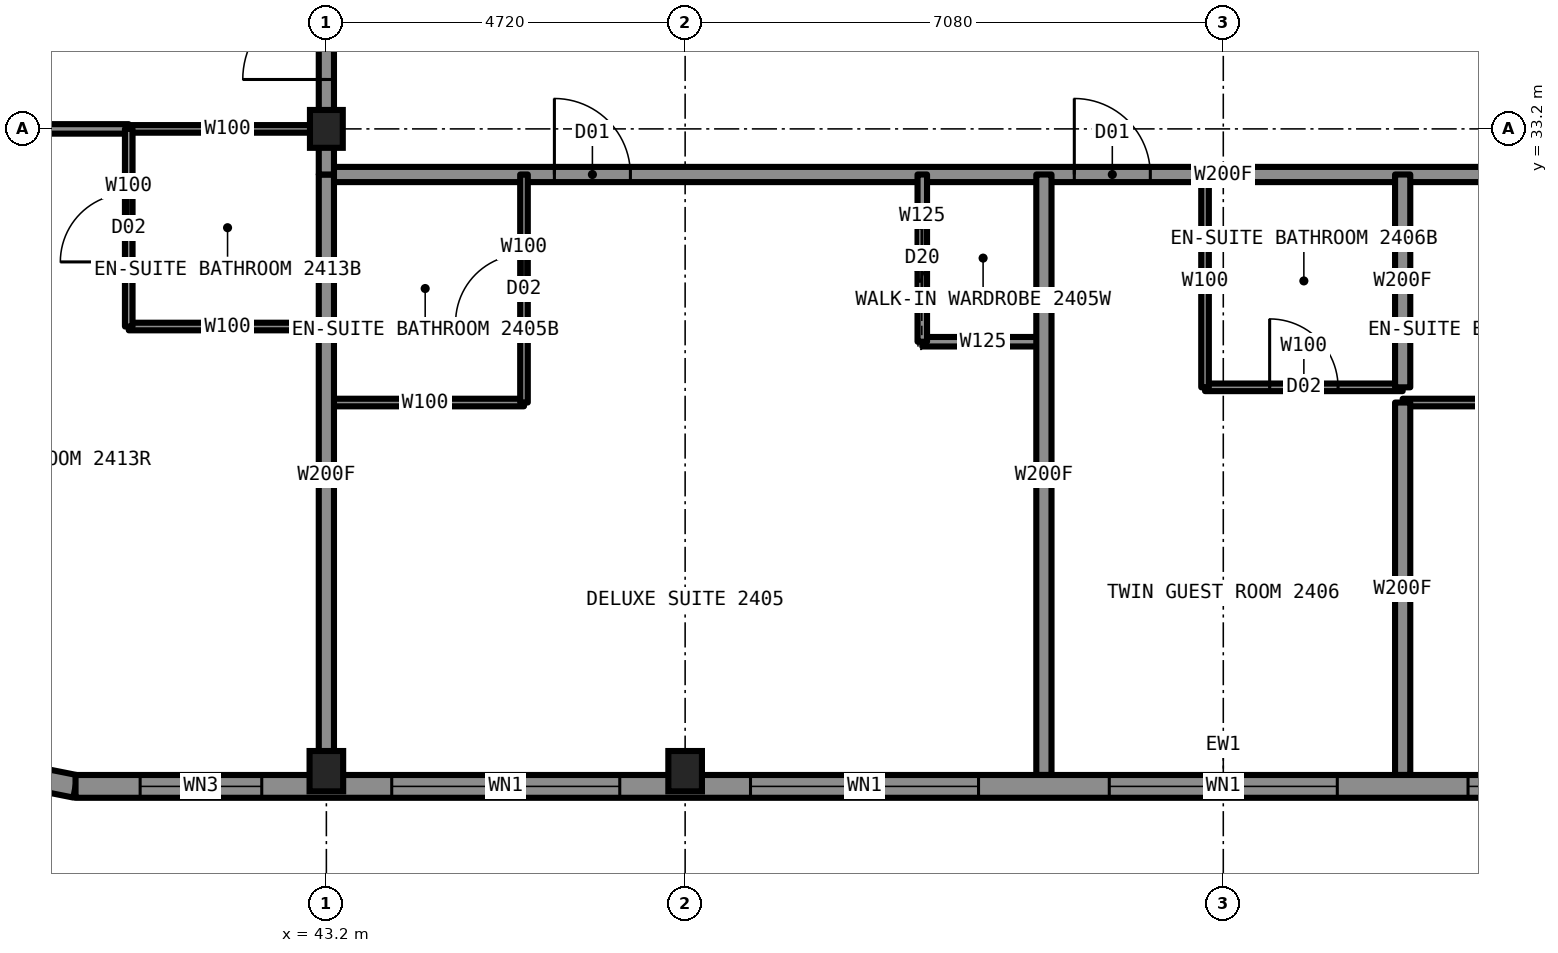
"""IFC4 building model, lengths in metres.
Left out: names, types, materials, properties, quantities, classifications, styles, units other than length and angle.
Written with IfcOpenShell. Run it as: python <this file> out.ifc"""

import sys

from ifc_helpers import new_model, si_unit, direction, frame, frame_2d, origin, origin_2d, place, context, subcontext, project, spatial, rectangle, i_section, extrude, element, fill, save


model = new_model("IFC4")
c1 = context("Model", 3, precision=1e-05, world=origin(), true_north=direction((0.0, 1.0)))
c2 = subcontext(c1, "Body", "Model", "MODEL_VIEW")
j1 = project(units=[si_unit("LENGTHUNIT", "METRE"), si_unit("PLANEANGLEUNIT", "RADIAN")], contexts=[c1])
p1 = place(None, origin())
s1 = spatial("IfcSite", under=j1, at=p1, CompositionType="ELEMENT")
p2 = place(p1, origin())
s2 = spatial("IfcBuilding", under=s1, at=p2, CompositionType="ELEMENT")
p3 = place(p2, frame((0.0, 0.0, 93.4)))
s3 = spatial("IfcBuildingStorey", under=s2, at=p3, CompositionType="ELEMENT", Elevation=93.4)
for number, where, z_axis, x_axis in (
    (1, (43.2, 24.75, 0.0), (0.0, 0.0, 1.0), (1.0, 0.0, 0.0)),
    (2, (47.92, 24.75, 0.0), (0.0, 0.0, 1.0), (1.0, 0.0, 0.0)),
):
    element("IfcColumn", number, at=place(p3, frame(where, z_axis=z_axis, x_axis=x_axis)), inside=s3, PredefinedType="COLUMN", context=c2, shape_type="SweptSolid", body=[
        extrude(i_section(OverallWidth=0.442, OverallDepth=0.531, WebThickness=0.066, FlangeThickness=0.106, at=origin_2d()), origin(), (0.0, 0.0, 1.0), 3.5),
    ])
p4 = place(p3, frame((43.2, 33.2, 0.0), z_axis=(0.0, 0.0, 1.0), x_axis=(1.0, 0.0, 0.0)))
e3 = element("IfcColumn", 3, at=p4, inside=s3, PredefinedType="COLUMN", context=c2, shape_type="SweptSolid", body=[
    extrude(i_section(OverallWidth=0.432, OverallDepth=0.498, WebThickness=0.056, FlangeThickness=0.089, at=origin_2d()), origin(), (0.0, 0.0, 1.0), 3.5),
])
p5 = place(p3, frame((40.6, 33.2, 0.0), z_axis=(0.0, 0.0, 1.0), x_axis=(1.0, 0.0, 0.0)))
e4 = element("IfcWall", 4, at=p5, inside=s3, PredefinedType="PARTITIONING", context=c2, shape_type="SweptSolid", body=[
    extrude(rectangle(XDim=2.6, YDim=0.1, at=frame_2d((1.3, 0.0))), origin(), (0.0, 0.0, 1.0), 2.573),
])
p6 = place(p3, frame((34.7, 33.2, 0.0), z_axis=(0.0, 0.0, 1.0), x_axis=(1.0, 0.0, 0.0)))
e5 = element("IfcWall", 5, at=p6, inside=s3, PredefinedType="PARTITIONING", context=c2, shape_type="SweptSolid", body=[
    extrude(rectangle(XDim=5.9, YDim=0.125, at=frame_2d((2.95, 0.0))), origin(), (0.0, 0.0, 1.0), 2.573),
])
p7 = place(p6, frame((3.85, 0.0, 0.0)))
e6 = element("IfcOpeningElement", 6, at=p7, cuts=e5, PredefinedType="OPENING", context=c2, shape_type="SweptSolid", body=[
    extrude(rectangle(XDim=0.9, YDim=2.2, at=frame_2d((0.45, 1.1))), frame((0.0, 0.073, 0.0), z_axis=(0.0, -1.0, 0.0), x_axis=(1.0, 0.0, 0.0)), (0.0, 0.0, 1.0), 0.145),
])
p8 = place(p3, frame((43.2, 32.6, 0.0), z_axis=(0.0, 0.0, 1.0), x_axis=(1.0, 0.0, 0.0)))
e7 = element("IfcWall", 7, at=p8, inside=s3, PredefinedType="PARTITIONING", context=c2, shape_type="SweptSolid", body=[
    extrude(rectangle(XDim=23.6, YDim=0.2, at=frame_2d((11.8, 0.0))), origin(), (0.0, 0.0, 1.0), 3.33),
])
p9 = place(p8, frame((3.0, 0.0, 0.0)))
e8 = element("IfcOpeningElement", 8, at=p9, cuts=e7, PredefinedType="OPENING", context=c2, shape_type="SweptSolid", body=[
    extrude(rectangle(XDim=1.0, YDim=2.2, at=frame_2d((0.5, 1.1))), frame((0.0, 0.11, 0.0), z_axis=(0.0, -1.0, 0.0), x_axis=(1.0, 0.0, 0.0)), (0.0, 0.0, 1.0), 0.22),
])
p10 = place(p8, frame((9.84, 0.0, 0.0)))
e9 = element("IfcOpeningElement", 9, at=p10, cuts=e7, PredefinedType="OPENING", context=c2, shape_type="SweptSolid", body=[
    extrude(rectangle(XDim=1.0, YDim=2.2, at=frame_2d((0.5, 1.1))), frame((0.0, 0.11, 0.0), z_axis=(0.0, -1.0, 0.0), x_axis=(1.0, 0.0, 0.0)), (0.0, 0.0, 1.0), 0.22),
])
p11 = place(p8, frame((17.16, 0.0, 0.0)))
e10 = element("IfcOpeningElement", 10, at=p11, cuts=e7, PredefinedType="OPENING", context=c2, shape_type="SweptSolid", body=[
    extrude(rectangle(XDim=1.0, YDim=2.2, at=frame_2d((0.5, 1.1))), frame((0.0, 0.11, 0.0), z_axis=(0.0, -1.0, 0.0), x_axis=(1.0, 0.0, 0.0)), (0.0, 0.0, 1.0), 0.22),
])
p12 = place(p3, frame((40.6, 30.6, 0.0), z_axis=(0.0, 0.0, 1.0), x_axis=(1.0, 0.0, 0.0)))
e11 = element("IfcWall", 11, at=p12, inside=s3, PredefinedType="PARTITIONING", context=c2, shape_type="SweptSolid", body=[
    extrude(rectangle(XDim=2.6, YDim=0.1, at=frame_2d((1.3, 0.0))), origin(), (0.0, 0.0, 1.0), 3.33),
])
p13 = place(p3, frame((51.04, 30.4, 0.0), z_axis=(0.0, 0.0, 1.0), x_axis=(1.0, 0.0, 0.0)))
e12 = element("IfcWall", 12, at=p13, inside=s3, PredefinedType="PARTITIONING", context=c2, shape_type="SweptSolid", body=[
    extrude(rectangle(XDim=1.6, YDim=0.125, at=frame_2d((0.8, 0.0))), origin(), (0.0, 0.0, 1.0), 3.33),
])
p14 = place(p3, frame((54.76, 29.8, 0.0), z_axis=(0.0, 0.0, 1.0), x_axis=(1.0, 0.0, 0.0)))
e13 = element("IfcWall", 13, at=p14, inside=s3, PredefinedType="PARTITIONING", context=c2, shape_type="SweptSolid", body=[
    extrude(rectangle(XDim=2.6, YDim=0.1, at=frame_2d((1.3, 0.0))), origin(), (0.0, 0.0, 1.0), 2.731),
])
p15 = place(p14, frame((0.85, 0.0, 0.0)))
e14 = element("IfcOpeningElement", 14, at=p15, cuts=e13, PredefinedType="OPENING", context=c2, shape_type="SweptSolid", body=[
    extrude(rectangle(XDim=0.9, YDim=2.1, at=frame_2d((0.45, 1.05))), frame((0.0, 0.06, 0.0), z_axis=(0.0, -1.0, 0.0), x_axis=(1.0, 0.0, 0.0)), (0.0, 0.0, 1.0), 0.12),
])
p16 = place(p3, frame((43.2, 29.6, 0.0), z_axis=(0.0, 0.0, 1.0), x_axis=(1.0, 0.0, 0.0)))
e15 = element("IfcWall", 15, at=p16, inside=s3, PredefinedType="PARTITIONING", context=c2, shape_type="SweptSolid", body=[
    extrude(rectangle(XDim=2.6, YDim=0.1, at=frame_2d((1.3, 0.0))), origin(), (0.0, 0.0, 1.0), 3.33),
])
p17 = place(p3, frame((57.36, 29.6, 0.0), z_axis=(0.0, 0.0, 1.0), x_axis=(1.0, 0.0, 0.0)))
e16 = element("IfcWall", 16, at=p17, inside=s3, PredefinedType="PARTITIONING", context=c2, shape_type="SweptSolid", body=[
    extrude(rectangle(XDim=2.6, YDim=0.1, at=frame_2d((1.3, 0.0))), origin(), (0.0, 0.0, 1.0), 3.33),
])
p18 = place(p3, frame((54.76, 29.8, 0.0), z_axis=(0.0, 0.0, 1.0), x_axis=(0.0, 1.0, 0.0)))
e17 = element("IfcWall", 17, at=p18, inside=s3, PredefinedType="PARTITIONING", context=c2, shape_type="SweptSolid", body=[
    extrude(rectangle(XDim=2.8, YDim=0.1, at=frame_2d((1.4, 0.0))), origin(), (0.0, 0.0, 1.0), 3.33),
])
p19 = place(p3, frame((43.2, 33.22, 0.0), z_axis=(0.0, 0.0, 1.0), x_axis=(0.0, 1.0, 0.0)))
e18 = element("IfcWall", 18, at=p19, inside=s3, PredefinedType="PARTITIONING", context=c2, shape_type="SweptSolid", body=[
    extrude(rectangle(XDim=23.56, YDim=0.2, at=frame_2d((11.78, 0.0))), origin(), (0.0, 0.0, 1.0), 3.33),
])
p20 = place(p19, frame((16.4, 0.0, 0.0)))
e19 = element("IfcOpeningElement", 19, at=p20, cuts=e18, PredefinedType="OPENING", context=c2, shape_type="SweptSolid", body=[
    extrude(rectangle(XDim=1.0, YDim=2.2, at=frame_2d((0.5, 1.1))), frame((0.0, 0.11, 0.0), z_axis=(0.0, -1.0, 0.0), x_axis=(1.0, 0.0, 0.0)), (0.0, 0.0, 1.0), 0.22),
])
p21 = place(p19, frame((21.83, 0.0, 0.0)))
e20 = element("IfcOpeningElement", 20, at=p21, cuts=e18, PredefinedType="OPENING", context=c2, shape_type="SweptSolid", body=[
    extrude(rectangle(XDim=1.1, YDim=2.2, at=frame_2d((0.55, 1.1))), frame((0.0, 0.11, 0.0), z_axis=(0.0, -1.0, 0.0), x_axis=(1.0, 0.0, 0.0)), (0.0, 0.0, 1.0), 0.22),
])
p22 = place(p19, frame((0.63, 0.0, 0.0)))
e21 = element("IfcOpeningElement", 21, at=p22, cuts=e18, PredefinedType="OPENING", context=c2, shape_type="SweptSolid", body=[
    extrude(rectangle(XDim=1.1, YDim=2.2, at=frame_2d((0.55, 1.1))), frame((0.0, 0.11, 0.0), z_axis=(0.0, -1.0, 0.0), x_axis=(1.0, 0.0, 0.0)), (0.0, 0.0, 1.0), 0.22),
])
p23 = place(p19, frame((7.45, 0.0, 0.0)))
e22 = element("IfcOpeningElement", 22, at=p23, cuts=e18, PredefinedType="OPENING", context=c2, shape_type="SweptSolid", body=[
    extrude(rectangle(XDim=2.0, YDim=2.4, at=frame_2d((1.0, 1.2))), frame((0.0, 0.11, 0.0), z_axis=(0.0, -1.0, 0.0), x_axis=(1.0, 0.0, 0.0)), (0.0, 0.0, 1.0), 0.22),
])
p24 = place(p19, frame((5.4, 0.0, 0.0)))
e23 = element("IfcOpeningElement", 23, at=p24, cuts=e18, PredefinedType="OPENING", context=c2, shape_type="SweptSolid", body=[
    extrude(rectangle(XDim=1.0, YDim=2.1, at=frame_2d((0.5, 1.05))), frame((0.0, 0.11, 0.0), z_axis=(0.0, -1.0, 0.0), x_axis=(1.0, 0.0, 0.0)), (0.0, 0.0, 1.0), 0.22),
])
p25 = place(p3, frame((43.2, 24.7, 0.0), z_axis=(0.0, 0.0, 1.0), x_axis=(0.0, 1.0, 0.0)))
e24 = element("IfcWall", 24, at=p25, inside=s3, PredefinedType="PARTITIONING", context=c2, shape_type="SweptSolid", body=[
    extrude(rectangle(XDim=7.9, YDim=0.2, at=frame_2d((3.95, 0.0))), origin(), (0.0, 0.0, 1.0), 2.573),
])
p26 = place(p3, frame((40.6, 30.6, 0.0), z_axis=(0.0, 0.0, 1.0), x_axis=(0.0, 1.0, 0.0)))
e25 = element("IfcWall", 25, at=p26, inside=s3, PredefinedType="PARTITIONING", context=c2, shape_type="SweptSolid", body=[
    extrude(rectangle(XDim=2.6, YDim=0.1, at=frame_2d((1.3, 0.0))), origin(), (0.0, 0.0, 1.0), 3.33),
])
p27 = place(p26, frame((0.85, 0.0, 0.0)))
e26 = element("IfcOpeningElement", 26, at=p27, cuts=e25, PredefinedType="OPENING", context=c2, shape_type="SweptSolid", body=[
    extrude(rectangle(XDim=0.9, YDim=2.1, at=frame_2d((0.45, 1.05))), frame((0.0, 0.06, 0.0), z_axis=(0.0, -1.0, 0.0), x_axis=(1.0, 0.0, 0.0)), (0.0, 0.0, 1.0), 0.12),
])
p28 = place(p3, frame((52.64, 24.7, 0.0), z_axis=(0.0, 0.0, 1.0), x_axis=(0.0, 1.0, 0.0)))
e27 = element("IfcWall", 27, at=p28, inside=s3, PredefinedType="PARTITIONING", context=c2, shape_type="SweptSolid", body=[
    extrude(rectangle(XDim=7.9, YDim=0.2, at=frame_2d((3.95, 0.0))), origin(), (0.0, 0.0, 1.0), 3.33),
])
p29 = place(p3, frame((51.04, 30.4, 0.0), z_axis=(0.0, 0.0, 1.0), x_axis=(0.0, 1.0, 0.0)))
e28 = element("IfcWall", 28, at=p29, inside=s3, PredefinedType="PARTITIONING", context=c2, shape_type="SweptSolid", body=[
    extrude(rectangle(XDim=2.2, YDim=0.125, at=frame_2d((1.1, 0.0))), origin(), (0.0, 0.0, 1.0), 3.33),
])
p30 = place(p29, frame((0.7, 0.0, 0.0)))
e29 = element("IfcOpeningElement", 29, at=p30, cuts=e28, PredefinedType="OPENING", context=c2, shape_type="SweptSolid", body=[
    extrude(rectangle(XDim=0.8, YDim=2.1, at=frame_2d((0.4, 1.05))), frame((0.0, 0.073, 0.0), z_axis=(0.0, -1.0, 0.0), x_axis=(1.0, 0.0, 0.0)), (0.0, 0.0, 1.0), 0.145),
])
p31 = place(p3, frame((45.8, 29.6, 0.0), z_axis=(0.0, 0.0, 1.0), x_axis=(0.0, 1.0, 0.0)))
e30 = element("IfcWall", 30, at=p31, inside=s3, PredefinedType="PARTITIONING", context=c2, shape_type="SweptSolid", body=[
    extrude(rectangle(XDim=3.0, YDim=0.1, at=frame_2d((1.5, 0.0))), origin(), (0.0, 0.0, 1.0), 3.33),
])
p32 = place(p31, frame((1.05, 0.0, 0.0)))
e31 = element("IfcOpeningElement", 31, at=p32, cuts=e30, PredefinedType="OPENING", context=c2, shape_type="SweptSolid", body=[
    extrude(rectangle(XDim=0.9, YDim=2.1, at=frame_2d((0.45, 1.05))), frame((0.0, 0.06, 0.0), z_axis=(0.0, -1.0, 0.0), x_axis=(1.0, 0.0, 0.0)), (0.0, 0.0, 1.0), 0.12),
])
p33 = place(p3, frame((57.36, 24.7, 0.0), z_axis=(0.0, 0.0, 1.0), x_axis=(0.0, 1.0, 0.0)))
e32 = element("IfcWall", 32, at=p33, inside=s3, PredefinedType="PARTITIONING", context=c2, shape_type="SweptSolid", body=[
    extrude(rectangle(XDim=4.9, YDim=0.2, at=frame_2d((2.45, 0.0))), origin(), (0.0, 0.0, 1.0), 3.33),
])
p34 = place(p3, frame((57.36, 29.8, 0.0), z_axis=(0.0, 0.0, 1.0), x_axis=(0.0, 1.0, 0.0)))
e33 = element("IfcWall", 33, at=p34, inside=s3, PredefinedType="PARTITIONING", context=c2, shape_type="SweptSolid", body=[
    extrude(rectangle(XDim=2.8, YDim=0.2, at=frame_2d((1.4, 0.0))), origin(), (0.0, 0.0, 1.0), 3.33),
])
p35 = place(p3, frame((37.853, 24.957, 0.0), z_axis=(0.0, 0.0, 1.0), x_axis=(0.980787050784, -0.195081421501, 0.0)))
e34 = element("IfcWall", 34, at=p35, inside=s3, PredefinedType="SOLIDWALL", context=c2, shape_type="SweptSolid", body=[
    extrude(rectangle(XDim=2.087, YDim=0.3, at=frame_2d((1.044, 0.0))), origin(), (0.0, 0.0, 1.0), 3.33),
])
p36 = place(p35, frame((0.444, 0.0, 0.5)))
e35 = element("IfcOpeningElement", 35, at=p36, cuts=e34, PredefinedType="OPENING", context=c2, shape_type="SweptSolid", body=[
    extrude(rectangle(XDim=1.2, YDim=2.0, at=frame_2d((0.6, 1.0))), frame((0.0, 0.16, 0.0), z_axis=(0.0, -1.0, 0.0), x_axis=(1.0, 0.0, 0.0)), (0.0, 0.0, 1.0), 0.32),
])
p37 = place(p3, frame((39.9, 24.55, 0.0), z_axis=(0.0, 0.0, 1.0), x_axis=(1.0, 0.0, 0.0)))
e36 = element("IfcWall", 36, at=p37, inside=s3, PredefinedType="SOLIDWALL", context=c2, shape_type="SweptSolid", body=[
    extrude(rectangle(XDim=30.2, YDim=0.3, at=frame_2d((15.1, 0.0))), origin(), (0.0, 0.0, 1.0), 2.83),
])
p38 = place(p37, frame((0.85, 0.0, 0.5)))
e37 = element("IfcOpeningElement", 37, at=p38, cuts=e36, PredefinedType="OPENING", context=c2, shape_type="SweptSolid", body=[
    extrude(rectangle(XDim=1.6, YDim=2.0, at=frame_2d((0.8, 1.0))), frame((0.0, 0.16, 0.0), z_axis=(0.0, -1.0, 0.0), x_axis=(1.0, 0.0, 0.0)), (0.0, 0.0, 1.0), 0.32),
])
p39 = place(p37, frame((4.16, 0.0, 0.5)))
e38 = element("IfcOpeningElement", 38, at=p39, cuts=e36, PredefinedType="OPENING", context=c2, shape_type="SweptSolid", body=[
    extrude(rectangle(XDim=3.0, YDim=2.0, at=frame_2d((1.5, 1.0))), frame((0.0, 0.16, 0.0), z_axis=(0.0, -1.0, 0.0), x_axis=(1.0, 0.0, 0.0)), (0.0, 0.0, 1.0), 0.32),
])
p40 = place(p37, frame((8.88, 0.0, 0.5)))
e39 = element("IfcOpeningElement", 39, at=p40, cuts=e36, PredefinedType="OPENING", context=c2, shape_type="SweptSolid", body=[
    extrude(rectangle(XDim=3.0, YDim=2.0, at=frame_2d((1.5, 1.0))), frame((0.0, 0.16, 0.0), z_axis=(0.0, -1.0, 0.0), x_axis=(1.0, 0.0, 0.0)), (0.0, 0.0, 1.0), 0.32),
])
p41 = place(p37, frame((13.6, 0.0, 0.5)))
e40 = element("IfcOpeningElement", 40, at=p41, cuts=e36, PredefinedType="OPENING", context=c2, shape_type="SweptSolid", body=[
    extrude(rectangle(XDim=3.0, YDim=2.0, at=frame_2d((1.5, 1.0))), frame((0.0, 0.16, 0.0), z_axis=(0.0, -1.0, 0.0), x_axis=(1.0, 0.0, 0.0)), (0.0, 0.0, 1.0), 0.32),
])
p42 = place(p37, frame((18.32, 0.0, 0.5)))
e41 = element("IfcOpeningElement", 41, at=p42, cuts=e36, PredefinedType="OPENING", context=c2, shape_type="SweptSolid", body=[
    extrude(rectangle(XDim=3.0, YDim=2.0, at=frame_2d((1.5, 1.0))), frame((0.0, 0.16, 0.0), z_axis=(0.0, -1.0, 0.0), x_axis=(1.0, 0.0, 0.0)), (0.0, 0.0, 1.0), 0.32),
])
p43 = place(p37, frame((23.04, 0.0, 0.5)))
e42 = element("IfcOpeningElement", 42, at=p43, cuts=e36, PredefinedType="OPENING", context=c2, shape_type="SweptSolid", body=[
    extrude(rectangle(XDim=3.0, YDim=2.0, at=frame_2d((1.5, 1.0))), frame((0.0, 0.16, 0.0), z_axis=(0.0, -1.0, 0.0), x_axis=(1.0, 0.0, 0.0)), (0.0, 0.0, 1.0), 0.32),
])
p44 = place(p37, frame((27.75, 0.0, 0.5)))
e43 = element("IfcOpeningElement", 43, at=p44, cuts=e36, PredefinedType="OPENING", context=c2, shape_type="SweptSolid", body=[
    extrude(rectangle(XDim=1.6, YDim=2.0, at=frame_2d((0.8, 1.0))), frame((0.0, 0.16, 0.0), z_axis=(0.0, -1.0, 0.0), x_axis=(1.0, 0.0, 0.0)), (0.0, 0.0, 1.0), 0.32),
])
p45 = place(p3, frame((43.2, 32.6, 0.0), z_axis=(0.0, 0.0, 1.0), x_axis=(0.0, 1.0, 0.0)))
e44 = element("IfcWall", 44, at=p45, inside=s3, PredefinedType="PARTITIONING", context=c2, shape_type="SweptSolid", body=[
    extrude(rectangle(XDim=0.62, YDim=0.2, at=frame_2d((0.31, 0.0))), origin(), (0.0, 0.0, 1.0), 2.573),
])
p46 = place(p9, origin())
e45 = element("IfcDoor", 45, at=p46, inside=s3, OperationType="SINGLE_SWING_LEFT", PredefinedType="DOOR", context=c2, shape_type="SweptSolid", body=[
    extrude(rectangle(XDim=1.0, YDim=2.2, at=frame_2d((0.5, 1.1))), frame((0.0, 0.025, 0.0), z_axis=(0.0, -1.0, 0.0), x_axis=(1.0, 0.0, 0.0)), (0.0, 0.0, 1.0), 0.05),
])
fill(e8, e45)
p47 = place(p32, origin())
e46 = element("IfcDoor", 46, at=p47, inside=s3, OperationType="SINGLE_SWING_RIGHT", PredefinedType="DOOR", context=c2, shape_type="SweptSolid", body=[
    extrude(rectangle(XDim=0.9, YDim=2.1, at=frame_2d((0.45, 1.05))), frame((0.0, 0.025, 0.0), z_axis=(0.0, -1.0, 0.0), x_axis=(1.0, 0.0, 0.0)), (0.0, 0.0, 1.0), 0.05),
])
fill(e31, e46)
p48 = place(p30, origin())
e47 = element("IfcDoor", 47, at=p48, inside=s3, OperationType="SLIDING_TO_LEFT", PredefinedType="DOOR", context=c2, shape_type="SweptSolid", body=[
    extrude(rectangle(XDim=0.8, YDim=2.1, at=frame_2d((0.4, 1.05))), frame((0.0, 0.025, 0.0), z_axis=(0.0, -1.0, 0.0), x_axis=(1.0, 0.0, 0.0)), (0.0, 0.0, 1.0), 0.05),
])
fill(e29, e47)
p49 = place(p10, origin())
e48 = element("IfcDoor", 48, at=p49, inside=s3, OperationType="SINGLE_SWING_LEFT", PredefinedType="DOOR", context=c2, shape_type="SweptSolid", body=[
    extrude(rectangle(XDim=1.0, YDim=2.2, at=frame_2d((0.5, 1.1))), frame((0.0, 0.025, 0.0), z_axis=(0.0, -1.0, 0.0), x_axis=(1.0, 0.0, 0.0)), (0.0, 0.0, 1.0), 0.05),
])
fill(e9, e48)
p50 = place(p15, origin())
e49 = element("IfcDoor", 49, at=p50, inside=s3, OperationType="SINGLE_SWING_RIGHT", PredefinedType="DOOR", context=c2, shape_type="SweptSolid", body=[
    extrude(rectangle(XDim=0.9, YDim=2.1, at=frame_2d((0.45, 1.05))), frame((0.0, 0.025, 0.0), z_axis=(0.0, -1.0, 0.0), x_axis=(1.0, 0.0, 0.0)), (0.0, 0.0, 1.0), 0.05),
])
fill(e14, e49)
p51 = place(p22, origin())
e50 = element("IfcDoor", 50, at=p51, inside=s3, OperationType="SINGLE_SWING_LEFT", PredefinedType="DOOR", context=c2, shape_type="SweptSolid", body=[
    extrude(rectangle(XDim=1.1, YDim=2.2, at=frame_2d((0.55, 1.1))), frame((0.0, 0.025, 0.0), z_axis=(0.0, -1.0, 0.0), x_axis=(1.0, 0.0, 0.0)), (0.0, 0.0, 1.0), 0.05),
])
fill(e21, e50)
p52 = place(p27, origin())
e51 = element("IfcDoor", 51, at=p52, inside=s3, OperationType="SINGLE_SWING_RIGHT", PredefinedType="DOOR", context=c2, shape_type="SweptSolid", body=[
    extrude(rectangle(XDim=0.9, YDim=2.1, at=frame_2d((0.45, 1.05))), frame((0.0, 0.025, 0.0), z_axis=(0.0, -1.0, 0.0), x_axis=(1.0, 0.0, 0.0)), (0.0, 0.0, 1.0), 0.05),
])
fill(e26, e51)
p53 = place(p38, origin())
e52 = element("IfcWindow", 52, at=p53, inside=s3, PartitioningType="SINGLE_PANEL", PredefinedType="WINDOW", context=c2, shape_type="SweptSolid", body=[
    extrude(rectangle(XDim=1.6, YDim=2.0, at=frame_2d((0.8, 1.0))), frame((0.0, 0.03, 0.0), z_axis=(0.0, -1.0, 0.0), x_axis=(1.0, 0.0, 0.0)), (0.0, 0.0, 1.0), 0.06),
])
fill(e37, e52)
p54 = place(p39, origin())
e53 = element("IfcWindow", 53, at=p54, inside=s3, PartitioningType="SINGLE_PANEL", PredefinedType="WINDOW", context=c2, shape_type="SweptSolid", body=[
    extrude(rectangle(XDim=3.0, YDim=2.0, at=frame_2d((1.5, 1.0))), frame((0.0, 0.03, 0.0), z_axis=(0.0, -1.0, 0.0), x_axis=(1.0, 0.0, 0.0)), (0.0, 0.0, 1.0), 0.06),
])
fill(e38, e53)
p55 = place(p40, origin())
e54 = element("IfcWindow", 54, at=p55, inside=s3, PartitioningType="SINGLE_PANEL", PredefinedType="WINDOW", context=c2, shape_type="SweptSolid", body=[
    extrude(rectangle(XDim=3.0, YDim=2.0, at=frame_2d((1.5, 1.0))), frame((0.0, 0.03, 0.0), z_axis=(0.0, -1.0, 0.0), x_axis=(1.0, 0.0, 0.0)), (0.0, 0.0, 1.0), 0.06),
])
fill(e39, e54)
p56 = place(p41, origin())
e55 = element("IfcWindow", 55, at=p56, inside=s3, PartitioningType="SINGLE_PANEL", PredefinedType="WINDOW", context=c2, shape_type="SweptSolid", body=[
    extrude(rectangle(XDim=3.0, YDim=2.0, at=frame_2d((1.5, 1.0))), frame((0.0, 0.03, 0.0), z_axis=(0.0, -1.0, 0.0), x_axis=(1.0, 0.0, 0.0)), (0.0, 0.0, 1.0), 0.06),
])
fill(e40, e55)
p57 = place(p42, origin())
e56 = element("IfcWindow", 56, at=p57, inside=s3, PartitioningType="SINGLE_PANEL", PredefinedType="WINDOW", context=c2, shape_type="SweptSolid", body=[
    extrude(rectangle(XDim=3.0, YDim=2.0, at=frame_2d((1.5, 1.0))), frame((0.0, 0.03, 0.0), z_axis=(0.0, -1.0, 0.0), x_axis=(1.0, 0.0, 0.0)), (0.0, 0.0, 1.0), 0.06),
])
fill(e41, e56)
save(model, sys.argv[1])
